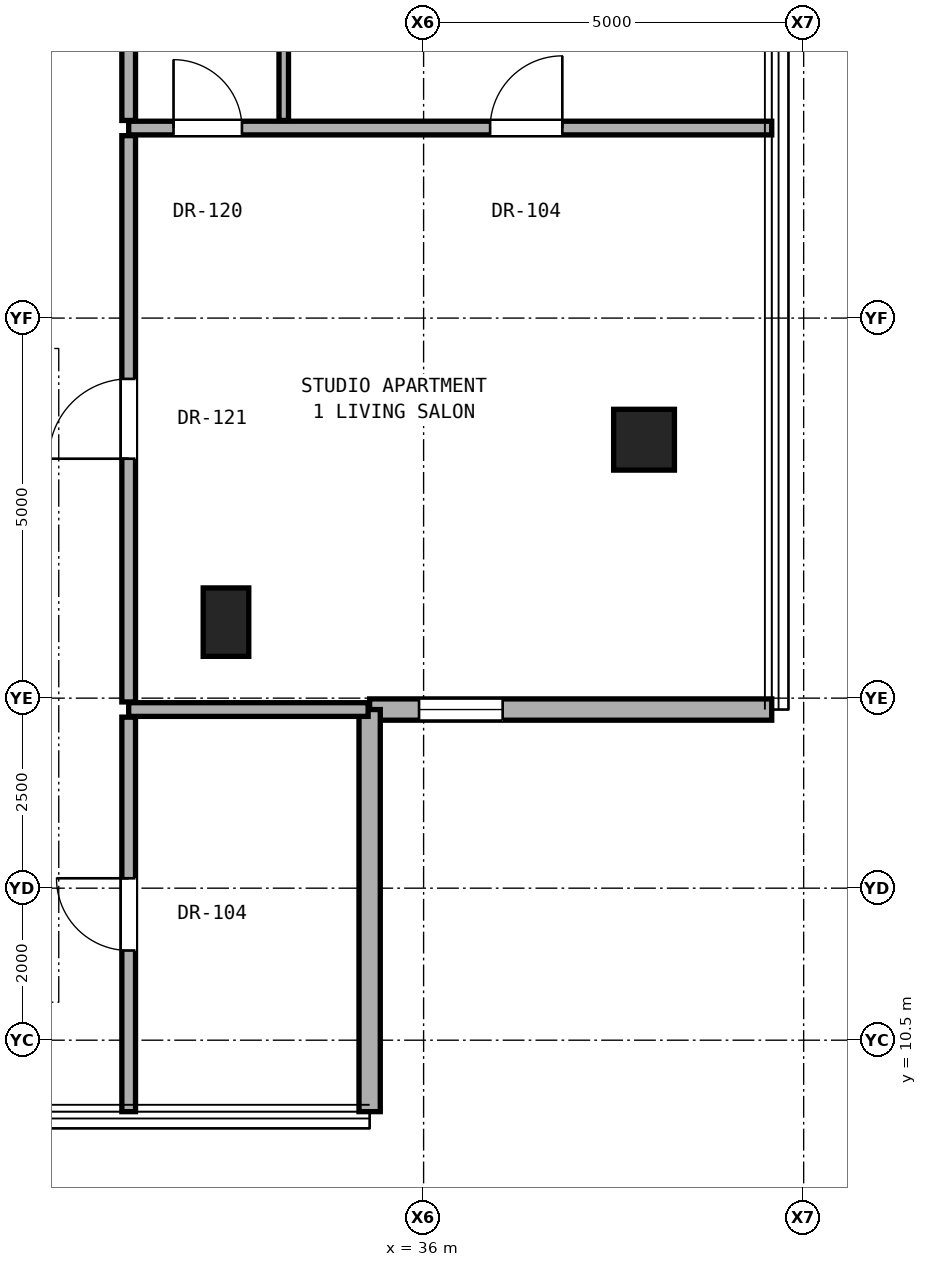
"""IFC4 building model, lengths in metres.
Left out: names, types, materials, properties, quantities, classifications, styles, units other than length and angle.
Written with IfcOpenShell. Run it as: python <this file> out.ifc"""

import sys

from ifc_helpers import new_model, si_unit, direction, frame, frame_2d, origin, origin_2d, place, context, subcontext, project, spatial, rectangle, hollow_rectangle, extrude, element, fill, save


model = new_model("IFC4")
c1 = context("Model", 3, precision=1e-05, world=origin(), true_north=direction((0.0, 1.0)))
c2 = subcontext(c1, "Body", "Model", "MODEL_VIEW")
j1 = project(units=[si_unit("LENGTHUNIT", "METRE"), si_unit("PLANEANGLEUNIT", "RADIAN")], contexts=[c1])
p1 = place(None, origin())
s1 = spatial("IfcSite", under=j1, at=p1, CompositionType="ELEMENT")
p2 = place(p1, origin())
s2 = spatial("IfcBuilding", under=s1, at=p2, CompositionType="ELEMENT")
p3 = place(p2, frame((0.0, 0.0, 219.4)))
s3 = spatial("IfcBuildingStorey", under=s2, at=p3, CompositionType="ELEMENT", Elevation=219.4)
p4 = place(p3, frame((38.9, 18.4, 0.0), z_axis=(0.0, 0.0, 1.0), x_axis=(1.0, 0.0, 0.0)))
e1 = element("IfcColumn", 1, at=p4, inside=s3, PredefinedType="COLUMN", context=c2, shape_type="SweptSolid", body=[
    extrude(hollow_rectangle(XDim=0.8, YDim=0.8, WallThickness=0.045, at=origin_2d()), origin(), (0.0, 0.0, 1.0), 3.3),
])
p5 = place(p3, frame((33.4, 16.0, 0.0), z_axis=(0.0, 0.0, 1.0), x_axis=(1.0, 0.0, 0.0)))
e2 = element("IfcColumn", 2, at=p5, inside=s3, PredefinedType="PILASTER", context=c2, shape_type="SweptSolid", body=[
    extrude(rectangle(XDim=0.6, YDim=0.9, at=origin_2d()), origin(), (0.0, 0.0, 1.0), 3.3),
])
p6 = place(p3, frame((35.29, 14.85, 0.0), z_axis=(0.0, 0.0, 1.0), x_axis=(1.0, 0.0, 0.0)))
e3 = element("IfcWall", 3, at=p6, inside=s3, PredefinedType="SOLIDWALL", context=c2, shape_type="SweptSolid", body=[
    extrude(rectangle(XDim=5.29, YDim=0.28, at=frame_2d((2.645, 0.0))), origin(), (0.0, 0.0, 1.0), 3.08),
])
p7 = place(p6, frame((0.65, 0.0, 0.85)))
e4 = element("IfcOpeningElement", 4, at=p7, cuts=e3, PredefinedType="OPENING", context=c2, shape_type="SweptSolid", body=[
    extrude(rectangle(XDim=1.1, YDim=2.0, at=frame_2d((0.55, 1.0))), frame((0.0, 0.15, 0.0), z_axis=(0.0, -1.0, 0.0), x_axis=(1.0, 0.0, 0.0)), (0.0, 0.0, 1.0), 0.3),
])
p8 = place(p3, frame((35.29, 9.56, 0.0), z_axis=(0.0, 0.0, 1.0), x_axis=(0.0, 1.0, 0.0)))
e5 = element("IfcWall", 5, at=p8, inside=s3, PredefinedType="SOLIDWALL", context=c2, shape_type="SweptSolid", body=[
    extrude(rectangle(XDim=5.29, YDim=0.28, at=frame_2d((2.645, 0.0))), origin(), (0.0, 0.0, 1.0), 3.08),
])
p9 = place(p3, frame((32.12, 14.85, 0.0), z_axis=(0.0, 0.0, 1.0), x_axis=(1.0, 0.0, 0.0)))
e6 = element("IfcWall", 6, at=p9, inside=s3, PredefinedType="PARTITIONING", context=c2, shape_type="SweptSolid", body=[
    extrude(rectangle(XDim=3.15, YDim=0.18, at=frame_2d((1.575, 0.0))), origin(), (0.0, 0.0, 1.0), 3.1),
])
p10 = place(p3, frame((32.12, 22.5, 0.0), z_axis=(0.0, 0.0, 1.0), x_axis=(1.0, 0.0, 0.0)))
e7 = element("IfcWall", 7, at=p10, inside=s3, PredefinedType="PARTITIONING", context=c2, shape_type="SweptSolid", body=[
    extrude(rectangle(XDim=8.46, YDim=0.18, at=frame_2d((4.23, 0.0))), origin(), (0.0, 0.0, 1.0), 2.319),
])
p11 = place(p10, frame((4.755, 0.0, 0.0)))
e8 = element("IfcOpeningElement", 8, at=p11, cuts=e7, PredefinedType="OPENING", context=c2, shape_type="SweptSolid", body=[
    extrude(rectangle(XDim=0.95, YDim=2.15, at=frame_2d((0.475, 1.075))), frame((0.0, 0.1, 0.0), z_axis=(0.0, -1.0, 0.0), x_axis=(1.0, 0.0, 0.0)), (0.0, 0.0, 1.0), 0.2),
])
p12 = place(p10, frame((0.59, 0.0, 0.0)))
e9 = element("IfcOpeningElement", 9, at=p12, cuts=e7, PredefinedType="OPENING", context=c2, shape_type="SweptSolid", body=[
    extrude(rectangle(XDim=0.9, YDim=2.1, at=frame_2d((0.45, 1.05))), frame((0.0, 0.1, 0.0), z_axis=(0.0, -1.0, 0.0), x_axis=(1.0, 0.0, 0.0)), (0.0, 0.0, 1.0), 0.2),
])
p13 = place(p3, frame((32.12, 9.56, 0.0), z_axis=(0.0, 0.0, 1.0), x_axis=(0.0, 1.0, 0.0)))
e10 = element("IfcWall", 10, at=p13, inside=s3, PredefinedType="PARTITIONING", context=c2, shape_type="SweptSolid", body=[
    extrude(rectangle(XDim=5.19, YDim=0.18, at=frame_2d((2.595, 0.0))), origin(), (0.0, 0.0, 1.0), 3.1),
])
p14 = place(p13, frame((2.12, 0.0, 0.0)))
e11 = element("IfcOpeningElement", 11, at=p14, cuts=e10, PredefinedType="OPENING", context=c2, shape_type="SweptSolid", body=[
    extrude(rectangle(XDim=0.95, YDim=2.15, at=frame_2d((0.475, 1.075))), frame((0.0, 0.1, 0.0), z_axis=(0.0, -1.0, 0.0), x_axis=(1.0, 0.0, 0.0)), (0.0, 0.0, 1.0), 0.2),
])
p15 = place(p3, frame((32.12, 14.95, 0.0), z_axis=(0.0, 0.0, 1.0), x_axis=(0.0, 1.0, 0.0)))
e12 = element("IfcWall", 12, at=p15, inside=s3, PredefinedType="PARTITIONING", context=c2, shape_type="SweptSolid", body=[
    extrude(rectangle(XDim=7.45, YDim=0.18, at=frame_2d((3.725, 0.0))), origin(), (0.0, 0.0, 1.0), 2.492),
])
p16 = place(p15, frame((3.2, 0.0, 0.0)))
e13 = element("IfcOpeningElement", 13, at=p16, cuts=e12, PredefinedType="OPENING", context=c2, shape_type="SweptSolid", body=[
    extrude(rectangle(XDim=1.05, YDim=2.2, at=frame_2d((0.525, 1.1))), frame((0.0, 0.1, 0.0), z_axis=(0.0, -1.0, 0.0), x_axis=(1.0, 0.0, 0.0)), (0.0, 0.0, 1.0), 0.2),
])
p17 = place(p3, frame((32.12, 22.6, 0.0), z_axis=(0.0, 0.0, 1.0), x_axis=(0.0, 1.0, 0.0)))
e14 = element("IfcWall", 14, at=p17, inside=s3, PredefinedType="PARTITIONING", context=c2, shape_type="SweptSolid", body=[
    extrude(rectangle(XDim=2.1, YDim=0.18, at=frame_2d((1.05, 0.0))), origin(), (0.0, 0.0, 1.0), 2.396),
])
p18 = place(p3, frame((34.16, 22.6, 0.0), z_axis=(0.0, 0.0, 1.0), x_axis=(0.0, 1.0, 0.0)))
e15 = element("IfcWall", 15, at=p18, inside=s3, PredefinedType="PARTITIONING", context=c2, shape_type="SweptSolid", body=[
    extrude(rectangle(XDim=2.1, YDim=0.125, at=frame_2d((1.05, 0.0))), origin(), (0.0, 0.0, 1.0), 2.396),
])
p19 = place(p7, origin())
e16 = element("IfcWindow", 16, at=p19, inside=s3, PartitioningType="SINGLE_PANEL", PredefinedType="WINDOW", context=c2, shape_type="SweptSolid", body=[
    extrude(rectangle(XDim=1.1, YDim=2.0, at=frame_2d((0.55, 1.0))), frame((0.0, 0.03, 0.0), z_axis=(0.0, -1.0, 0.0), x_axis=(1.0, 0.0, 0.0)), (0.0, 0.0, 1.0), 0.06),
])
fill(e4, e16)
p20 = place(p16, origin())
e17 = element("IfcDoor", 17, at=p20, inside=s3, OperationType="SINGLE_SWING_LEFT", PredefinedType="DOOR", context=c2, shape_type="SweptSolid", body=[
    extrude(rectangle(XDim=1.05, YDim=2.2, at=frame_2d((0.525, 1.1))), frame((0.0, 0.025, 0.0), z_axis=(0.0, -1.0, 0.0), x_axis=(1.0, 0.0, 0.0)), (0.0, 0.0, 1.0), 0.05),
])
fill(e13, e17)
p21 = place(p11, origin())
e18 = element("IfcDoor", 18, at=p21, inside=s3, OperationType="SINGLE_SWING_RIGHT", PredefinedType="DOOR", context=c2, shape_type="SweptSolid", body=[
    extrude(rectangle(XDim=0.95, YDim=2.15, at=frame_2d((0.475, 1.075))), frame((0.0, 0.025, 0.0), z_axis=(0.0, -1.0, 0.0), x_axis=(1.0, 0.0, 0.0)), (0.0, 0.0, 1.0), 0.05),
])
fill(e8, e18)
p22 = place(p12, origin())
e19 = element("IfcDoor", 19, at=p22, inside=s3, OperationType="SINGLE_SWING_LEFT", PredefinedType="DOOR", context=c2, shape_type="SweptSolid", body=[
    extrude(rectangle(XDim=0.9, YDim=2.1, at=frame_2d((0.45, 1.05))), frame((0.0, 0.025, 0.0), z_axis=(0.0, -1.0, 0.0), x_axis=(1.0, 0.0, 0.0)), (0.0, 0.0, 1.0), 0.05),
])
fill(e9, e19)
p23 = place(p14, origin())
e20 = element("IfcDoor", 20, at=p23, inside=s3, OperationType="SINGLE_SWING_RIGHT", PredefinedType="DOOR", context=c2, shape_type="SweptSolid", body=[
    extrude(rectangle(XDim=0.95, YDim=2.15, at=frame_2d((0.475, 1.075))), frame((0.0, 0.025, 0.0), z_axis=(0.0, -1.0, 0.0), x_axis=(1.0, 0.0, 0.0)), (0.0, 0.0, 1.0), 0.05),
])
fill(e11, e20)
save(model, sys.argv[1])
